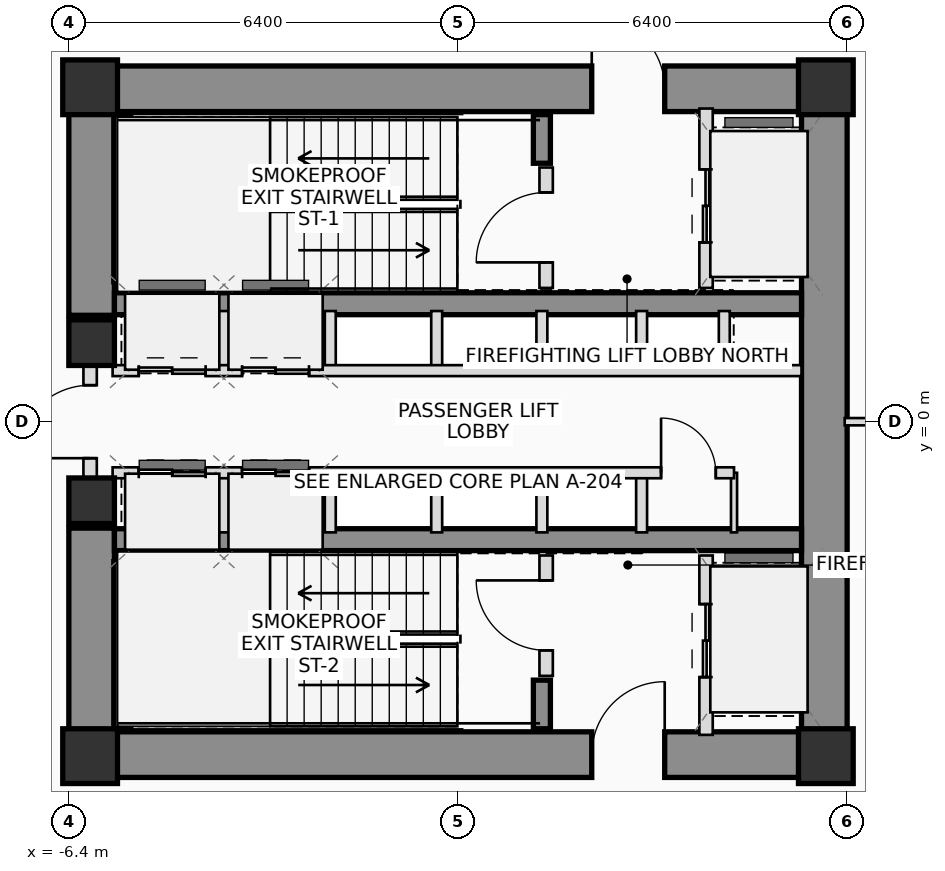
"""IFC4 building model, lengths in metres.
Left out: names, types, materials, properties, quantities, classifications, styles, units other than length and angle.
Written with IfcOpenShell. Run it as: python <this file> out.ifc"""

import sys

from ifc_helpers import new_model, si_unit, direction, frame, frame_2d, origin, origin_2d, place, context, subcontext, project, spatial, rectangle, extrude, source, transform, mapped, element, fill, save


model = new_model("IFC4")
c1 = context("Model", 3, precision=1e-05, world=origin(), true_north=direction((0.0, 1.0)))
c2 = subcontext(c1, "Body", "Model", "MODEL_VIEW")
j1 = project(units=[si_unit("LENGTHUNIT", "METRE"), si_unit("PLANEANGLEUNIT", "RADIAN")], contexts=[c1])
p1 = place(None, origin())
s1 = spatial("IfcSite", under=j1, at=p1, CompositionType="ELEMENT")
p2 = place(p1, origin())
s2 = spatial("IfcBuilding", under=s1, at=p2, CompositionType="ELEMENT")
p3 = place(p2, frame((0.0, 0.0, 23.8)))
s3 = spatial("IfcBuildingStorey", under=s2, at=p3, CompositionType="ELEMENT", Elevation=23.8)
m1 = source(origin(), c2, "Body", "SweptSolid", [
    extrude(rectangle(XDim=0.9, YDim=0.9, at=origin_2d()), origin(), (0.0, 0.0, 1.0), 3.7),
])
for number, where, z_axis, x_axis in (
    (1, (-6.05, -5.5, 0.0), (0.0, 0.0, 1.0), (1.0, 0.0, 0.0)),
    (2, (6.05, -5.5, 0.0), (0.0, 0.0, 1.0), (1.0, 0.0, 0.0)),
    (3, (6.05, 5.5, 0.0), (0.0, 0.0, 1.0), (1.0, 0.0, 0.0)),
    (4, (-6.05, 5.5, 0.0), (0.0, 0.0, 1.0), (1.0, 0.0, 0.0)),
):
    element("IfcColumn", number, at=place(p3, frame(where, z_axis=z_axis, x_axis=x_axis)), inside=s3, PredefinedType="COLUMN", context=c2, shape_type="MappedRepresentation", body=[
        mapped(m1, transform((0.0, 0.0, 0.0), scale=1.0)),
    ])
p4 = place(p3, frame((-6.4, 5.475, 0.0), z_axis=(0.0, 0.0, 1.0), x_axis=(1.0, 0.0, 0.0)))
e5 = element("IfcWall", 5, at=p4, inside=s3, PredefinedType="SHEAR", context=c2, shape_type="SweptSolid", body=[
    extrude(rectangle(XDim=12.8, YDim=0.75, at=frame_2d((6.4, 0.0))), origin(), (0.0, 0.0, 1.0), 3.7),
])
p5 = place(p4, frame((8.6, 0.0, 0.0)))
e6 = element("IfcOpeningElement", 6, at=p5, cuts=e5, PredefinedType="OPENING", context=c2, shape_type="SweptSolid", body=[
    extrude(rectangle(XDim=1.2, YDim=2.2, at=frame_2d((0.6, 1.1))), frame((0.0, 0.385, 0.0), z_axis=(0.0, -1.0, 0.0), x_axis=(1.0, 0.0, 0.0)), (0.0, 0.0, 1.0), 0.77),
])
p6 = place(p3, frame((-6.4, -5.475, 0.0), z_axis=(0.0, 0.0, 1.0), x_axis=(1.0, 0.0, 0.0)))
e7 = element("IfcWall", 7, at=p6, inside=s3, PredefinedType="SHEAR", context=c2, shape_type="SweptSolid", body=[
    extrude(rectangle(XDim=12.8, YDim=0.75, at=frame_2d((6.4, 0.0))), origin(), (0.0, 0.0, 1.0), 3.7),
])
p7 = place(p6, frame((8.6, 0.0, 0.0)))
e8 = element("IfcOpeningElement", 8, at=p7, cuts=e7, PredefinedType="OPENING", context=c2, shape_type="SweptSolid", body=[
    extrude(rectangle(XDim=1.2, YDim=2.2, at=frame_2d((0.6, 1.1))), frame((0.0, 0.385, 0.0), z_axis=(0.0, -1.0, 0.0), x_axis=(1.0, 0.0, 0.0)), (0.0, 0.0, 1.0), 0.77),
])
p8 = place(p3, frame((6.025, -5.1, 0.0), z_axis=(0.0, 0.0, 1.0), x_axis=(0.0, 1.0, 0.0)))
e9 = element("IfcWall", 9, at=p8, inside=s3, PredefinedType="SHEAR", context=c2, shape_type="SweptSolid", body=[
    extrude(rectangle(XDim=10.2, YDim=0.75, at=frame_2d((5.1, 0.0))), origin(), (0.0, 0.0, 1.0), 3.7),
])
for number, where, z_axis, x_axis in (
    (10, (-6.025, -5.1, 0.0), (0.0, 0.0, 1.0), (0.0, 1.0, 0.0)),
    (11, (-6.025, 1.75, 0.0), (0.0, 0.0, 1.0), (0.0, 1.0, 0.0)),
):
    element("IfcWall", number, at=place(p3, frame(where, z_axis=z_axis, x_axis=x_axis)), inside=s3, PredefinedType="SHEAR", context=c2, shape_type="SweptSolid", body=[
        extrude(rectangle(XDim=3.35, YDim=0.75, at=frame_2d((1.675, 0.0))), origin(), (0.0, 0.0, 1.0), 3.7),
    ])
for number, where, z_axis, x_axis in (
    (12, (-5.65, 1.94, 0.0), (0.0, 0.0, 1.0), (1.0, 0.0, 0.0)),
    (13, (-5.65, -1.94, 0.0), (0.0, 0.0, 1.0), (1.0, 0.0, 0.0)),
):
    element("IfcWall", number, at=place(p3, frame(where, z_axis=z_axis, x_axis=x_axis)), inside=s3, PredefinedType="SHEAR", context=c2, shape_type="SweptSolid", body=[
        extrude(rectangle(XDim=11.3, YDim=0.36, at=frame_2d((5.65, 0.0))), origin(), (0.0, 0.0, 1.0), 3.7),
    ])
p9 = place(p3, frame((-5.52, 2.3, 0.0), z_axis=(0.0, 0.0, 1.0), x_axis=(0.0, 1.0, 0.0)))
e14 = element("IfcWall", 14, at=p9, inside=s3, PredefinedType="SHEAR", context=c2, shape_type="SweptSolid", body=[
    extrude(rectangle(XDim=2.75, YDim=0.28, at=frame_2d((1.375, 0.0))), origin(), (0.0, 0.0, 1.0), 3.7),
])
p10 = place(p3, frame((1.38, 4.25, 0.0), z_axis=(0.0, 0.0, 1.0), x_axis=(0.0, 1.0, 0.0)))
e15 = element("IfcWall", 15, at=p10, inside=s3, PredefinedType="SHEAR", context=c2, shape_type="SweptSolid", body=[
    extrude(rectangle(XDim=0.8, YDim=0.28, at=frame_2d((0.4, 0.0))), origin(), (0.0, 0.0, 1.0), 3.7),
])
p11 = place(p3, frame((-5.52, -5.05, 0.0), z_axis=(0.0, 0.0, 1.0), x_axis=(0.0, 1.0, 0.0)))
e16 = element("IfcWall", 16, at=p11, inside=s3, PredefinedType="SHEAR", context=c2, shape_type="SweptSolid", body=[
    extrude(rectangle(XDim=2.75, YDim=0.28, at=frame_2d((1.375, 0.0))), origin(), (0.0, 0.0, 1.0), 3.7),
])
p12 = place(p3, frame((1.38, -5.05, 0.0), z_axis=(0.0, 0.0, 1.0), x_axis=(0.0, 1.0, 0.0)))
e17 = element("IfcWall", 17, at=p12, inside=s3, PredefinedType="SHEAR", context=c2, shape_type="SweptSolid", body=[
    extrude(rectangle(XDim=0.8, YDim=0.28, at=frame_2d((0.4, 0.0))), origin(), (0.0, 0.0, 1.0), 3.7),
])
m2 = source(origin(), c2, "Body", "SweptSolid", [
    extrude(rectangle(XDim=0.75, YDim=0.75, at=origin_2d()), origin(), (0.0, 0.0, 1.0), 3.7),
])
for number, where, z_axis, x_axis in (
    (18, (-6.025, -1.3, 0.0), (0.0, 0.0, 1.0), (1.0, 0.0, 0.0)),
    (19, (-6.025, 1.3, 0.0), (0.0, 0.0, 1.0), (1.0, 0.0, 0.0)),
):
    element("IfcColumn", number, at=place(p3, frame(where, z_axis=z_axis, x_axis=x_axis)), inside=s3, PredefinedType="COLUMN", context=c2, shape_type="MappedRepresentation", body=[
        mapped(m2, transform((0.0, 0.0, 0.0), scale=1.0)),
    ])
p13 = place(p3, frame((-6.05, -0.95, 0.0), z_axis=(0.0, 0.0, 1.0), x_axis=(0.0, 1.0, 0.0)))
e20 = element("IfcWall", 20, at=p13, inside=s3, PredefinedType="PLUMBINGWALL", context=c2, shape_type="SweptSolid", body=[
    extrude(rectangle(XDim=1.9, YDim=0.22, at=frame_2d((0.95, 0.0))), origin(), (0.0, 0.0, 1.0), 2.475),
])
p14 = place(p13, frame((0.35, 0.0, 0.0)))
e21 = element("IfcOpeningElement", 21, at=p14, cuts=e20, PredefinedType="OPENING", context=c2, shape_type="SweptSolid", body=[
    extrude(rectangle(XDim=1.2, YDim=2.2, at=frame_2d((0.6, 1.1))), frame((0.0, 0.12, 0.0), z_axis=(0.0, -1.0, 0.0), x_axis=(1.0, 0.0, 0.0)), (0.0, 0.0, 1.0), 0.24),
])
p15 = place(p3, frame((1.45, 2.2, 0.0), z_axis=(0.0, 0.0, 1.0), x_axis=(0.0, 1.0, 0.0)))
e22 = element("IfcWall", 22, at=p15, inside=s3, PredefinedType="PLUMBINGWALL", context=c2, shape_type="SweptSolid", body=[
    extrude(rectangle(XDim=1.98, YDim=0.22, at=frame_2d((0.99, 0.0))), origin(), (0.0, 0.0, 1.0), 3.495),
])
p16 = place(p15, frame((0.42, 0.0, 0.0)))
e23 = element("IfcOpeningElement", 23, at=p16, cuts=e22, PredefinedType="OPENING", context=c2, shape_type="SweptSolid", body=[
    extrude(rectangle(XDim=1.15, YDim=2.15, at=frame_2d((0.575, 1.075))), frame((0.0, 0.12, 0.0), z_axis=(0.0, -1.0, 0.0), x_axis=(1.0, 0.0, 0.0)), (0.0, 0.0, 1.0), 0.24),
])
p17 = place(p3, frame((4.08, 2.2, 0.0), z_axis=(0.0, 0.0, 1.0), x_axis=(0.0, 1.0, 0.0)))
e24 = element("IfcWall", 24, at=p17, inside=s3, PredefinedType="PLUMBINGWALL", context=c2, shape_type="SweptSolid", body=[
    extrude(rectangle(XDim=2.95, YDim=0.22, at=frame_2d((1.475, 0.0))), origin(), (0.0, 0.0, 1.0), 3.495),
])
p18 = place(p17, frame((0.75, 0.0, 0.0)))
e25 = element("IfcOpeningElement", 25, at=p18, cuts=e24, PredefinedType="OPENING", context=c2, shape_type="SweptSolid", body=[
    extrude(rectangle(XDim=1.2, YDim=2.25, at=frame_2d((0.6, 1.125))), frame((0.0, 0.12, 0.0), z_axis=(0.0, -1.0, 0.0), x_axis=(1.0, 0.0, 0.0)), (0.0, 0.0, 1.0), 0.24),
])
p19 = place(p3, frame((1.45, -4.18, 0.0), z_axis=(0.0, 0.0, 1.0), x_axis=(0.0, 1.0, 0.0)))
e26 = element("IfcWall", 26, at=p19, inside=s3, PredefinedType="PLUMBINGWALL", context=c2, shape_type="SweptSolid", body=[
    extrude(rectangle(XDim=1.98, YDim=0.22, at=frame_2d((0.99, 0.0))), origin(), (0.0, 0.0, 1.0), 3.495),
])
p20 = place(p19, frame((0.42, 0.0, 0.0)))
e27 = element("IfcOpeningElement", 27, at=p20, cuts=e26, PredefinedType="OPENING", context=c2, shape_type="SweptSolid", body=[
    extrude(rectangle(XDim=1.15, YDim=2.15, at=frame_2d((0.575, 1.075))), frame((0.0, 0.12, 0.0), z_axis=(0.0, -1.0, 0.0), x_axis=(1.0, 0.0, 0.0)), (0.0, 0.0, 1.0), 0.24),
])
p21 = place(p3, frame((4.08, -5.15, 0.0), z_axis=(0.0, 0.0, 1.0), x_axis=(0.0, 1.0, 0.0)))
e28 = element("IfcWall", 28, at=p21, inside=s3, PredefinedType="PLUMBINGWALL", context=c2, shape_type="SweptSolid", body=[
    extrude(rectangle(XDim=2.95, YDim=0.22, at=frame_2d((1.475, 0.0))), origin(), (0.0, 0.0, 1.0), 3.495),
])
p22 = place(p21, frame((0.95, 0.0, 0.0)))
e29 = element("IfcOpeningElement", 29, at=p22, cuts=e28, PredefinedType="OPENING", context=c2, shape_type="SweptSolid", body=[
    extrude(rectangle(XDim=1.2, YDim=2.25, at=frame_2d((0.6, 1.125))), frame((0.0, 0.12, 0.0), z_axis=(0.0, -1.0, 0.0), x_axis=(1.0, 0.0, 0.0)), (0.0, 0.0, 1.0), 0.24),
])
for number, where, z_axis, x_axis in (
    (30, (-3.85, 0.84, 0.0), (0.0, 0.0, 1.0), (0.0, 1.0, 0.0)),
    (31, (-3.85, -1.82, 0.0), (0.0, 0.0, 1.0), (0.0, 1.0, 0.0)),
    (32, (-2.1, 0.84, 0.0), (0.0, 0.0, 1.0), (0.0, 1.0, 0.0)),
    (33, (-2.1, -1.82, 0.0), (0.0, 0.0, 1.0), (0.0, 1.0, 0.0)),
    (34, (-0.35, 0.84, 0.0), (0.0, 0.0, 1.0), (0.0, 1.0, 0.0)),
    (35, (-0.35, -1.82, 0.0), (0.0, 0.0, 1.0), (0.0, 1.0, 0.0)),
    (36, (1.38, 0.84, 0.0), (0.0, 0.0, 1.0), (0.0, 1.0, 0.0)),
    (37, (1.38, -1.82, 0.0), (0.0, 0.0, 1.0), (0.0, 1.0, 0.0)),
    (38, (3.02, 0.84, 0.0), (0.0, 0.0, 1.0), (0.0, 1.0, 0.0)),
    (39, (4.38, 0.84, 0.0), (0.0, 0.0, 1.0), (0.0, 1.0, 0.0)),
    (40, (3.02, -1.82, 0.0), (0.0, 0.0, 1.0), (0.0, 1.0, 0.0)),
):
    element("IfcWall", number, at=place(p3, frame(where, z_axis=z_axis, x_axis=x_axis)), inside=s3, PredefinedType="PLUMBINGWALL", context=c2, shape_type="SweptSolid", body=[
        extrude(rectangle(XDim=0.98, YDim=0.18, at=frame_2d((0.49, 0.0))), origin(), (0.0, 0.0, 1.0), 3.495),
    ])
p23 = place(p3, frame((4.54, -1.82, 0.0), z_axis=(0.0, 0.0, 1.0), x_axis=(0.0, 1.0, 0.0)))
e41 = element("IfcWall", 41, at=p23, inside=s3, PredefinedType="PARTITIONING", context=c2, shape_type="SweptSolid", body=[
    extrude(rectangle(XDim=0.98, YDim=0.1, at=frame_2d((0.49, 0.0))), origin(), (0.0, 0.0, 1.0), 3.495),
])
p24 = place(p3, frame((-5.68, 0.84, 0.0), z_axis=(0.0, 0.0, 1.0), x_axis=(1.0, 0.0, 0.0)))
e42 = element("IfcWall", 42, at=p24, inside=s3, PredefinedType="PLUMBINGWALL", context=c2, shape_type="SweptSolid", body=[
    extrude(rectangle(XDim=11.33, YDim=0.18, at=frame_2d((5.665, 0.0))), origin(), (0.0, 0.0, 1.0), 3.495),
])
p25 = place(p24, frame((0.43, 0.0, 0.0)))
e43 = element("IfcOpeningElement", 43, at=p25, cuts=e42, PredefinedType="OPENING", context=c2, shape_type="SweptSolid", body=[
    extrude(rectangle(XDim=1.1, YDim=2.2, at=frame_2d((0.55, 1.1))), frame((0.0, 0.1, 0.0), z_axis=(0.0, -1.0, 0.0), x_axis=(1.0, 0.0, 0.0)), (0.0, 0.0, 1.0), 0.2),
])
p26 = place(p24, frame((2.13, 0.0, 0.0)))
e44 = element("IfcOpeningElement", 44, at=p26, cuts=e42, PredefinedType="OPENING", context=c2, shape_type="SweptSolid", body=[
    extrude(rectangle(XDim=1.1, YDim=2.2, at=frame_2d((0.55, 1.1))), frame((0.0, 0.1, 0.0), z_axis=(0.0, -1.0, 0.0), x_axis=(1.0, 0.0, 0.0)), (0.0, 0.0, 1.0), 0.2),
])
p27 = place(p3, frame((-5.68, -0.84, 0.0), z_axis=(0.0, 0.0, 1.0), x_axis=(1.0, 0.0, 0.0)))
e45 = element("IfcWall", 45, at=p27, inside=s3, PredefinedType="PLUMBINGWALL", context=c2, shape_type="SweptSolid", body=[
    extrude(rectangle(XDim=10.22, YDim=0.18, at=frame_2d((5.11, 0.0))), origin(), (0.0, 0.0, 1.0), 3.495),
])
p28 = place(p27, frame((0.43, 0.0, 0.0)))
e46 = element("IfcOpeningElement", 46, at=p28, cuts=e45, PredefinedType="OPENING", context=c2, shape_type="SweptSolid", body=[
    extrude(rectangle(XDim=1.1, YDim=2.2, at=frame_2d((0.55, 1.1))), frame((0.0, 0.1, 0.0), z_axis=(0.0, -1.0, 0.0), x_axis=(1.0, 0.0, 0.0)), (0.0, 0.0, 1.0), 0.2),
])
p29 = place(p27, frame((2.13, 0.0, 0.0)))
e47 = element("IfcOpeningElement", 47, at=p29, cuts=e45, PredefinedType="OPENING", context=c2, shape_type="SweptSolid", body=[
    extrude(rectangle(XDim=1.1, YDim=2.2, at=frame_2d((0.55, 1.1))), frame((0.0, 0.1, 0.0), z_axis=(0.0, -1.0, 0.0), x_axis=(1.0, 0.0, 0.0)), (0.0, 0.0, 1.0), 0.2),
])
p30 = place(p27, frame((9.02, 0.0, 0.0)))
e48 = element("IfcOpeningElement", 48, at=p30, cuts=e45, PredefinedType="OPENING", context=c2, shape_type="SweptSolid", body=[
    extrude(rectangle(XDim=0.9, YDim=2.05, at=frame_2d((0.45, 1.025))), frame((0.0, 0.1, 0.0), z_axis=(0.0, -1.0, 0.0), x_axis=(1.0, 0.0, 0.0)), (0.0, 0.0, 1.0), 0.2),
])
p31 = place(p3, frame((6.36, 0.0, 0.0), z_axis=(0.0, 0.0, 1.0), x_axis=(1.0, 0.0, 0.0)))
e49 = element("IfcWall", 49, at=p31, inside=s3, PredefinedType="PARTITIONING", context=c2, shape_type="SweptSolid", body=[
    extrude(rectangle(XDim=19.191, YDim=0.12, at=frame_2d((9.595, 0.0))), origin(), (0.0, 0.0, 1.0), 2.96),
])
p32 = place(p5, origin())
e50 = element("IfcDoor", 50, at=p32, inside=s3, OperationType="SINGLE_SWING_LEFT", PredefinedType="DOOR", context=c2, shape_type="SweptSolid", body=[
    extrude(rectangle(XDim=1.2, YDim=2.2, at=frame_2d((0.6, 1.1))), frame((0.0, 0.025, 0.0), z_axis=(0.0, -1.0, 0.0), x_axis=(1.0, 0.0, 0.0)), (0.0, 0.0, 1.0), 0.05),
])
fill(e6, e50)
p33 = place(p7, origin())
e51 = element("IfcDoor", 51, at=p33, inside=s3, OperationType="SINGLE_SWING_RIGHT", PredefinedType="DOOR", context=c2, shape_type="SweptSolid", body=[
    extrude(rectangle(XDim=1.2, YDim=2.2, at=frame_2d((0.6, 1.1))), frame((0.0, 0.025, 0.0), z_axis=(0.0, -1.0, 0.0), x_axis=(1.0, 0.0, 0.0)), (0.0, 0.0, 1.0), 0.05),
])
fill(e8, e51)
p34 = place(p14, origin())
e52 = element("IfcDoor", 52, at=p34, inside=s3, OperationType="SINGLE_SWING_LEFT", PredefinedType="DOOR", context=c2, shape_type="SweptSolid", body=[
    extrude(rectangle(XDim=1.2, YDim=2.2, at=frame_2d((0.6, 1.1))), frame((0.0, 0.025, 0.0), z_axis=(0.0, -1.0, 0.0), x_axis=(1.0, 0.0, 0.0)), (0.0, 0.0, 1.0), 0.05),
])
fill(e21, e52)
p35 = place(p16, origin())
e53 = element("IfcDoor", 53, at=p35, inside=s3, OperationType="SINGLE_SWING_LEFT", PredefinedType="DOOR", context=c2, shape_type="SweptSolid", body=[
    extrude(rectangle(XDim=1.15, YDim=2.15, at=frame_2d((0.575, 1.075))), frame((0.0, 0.025, 0.0), z_axis=(0.0, -1.0, 0.0), x_axis=(1.0, 0.0, 0.0)), (0.0, 0.0, 1.0), 0.05),
])
fill(e23, e53)
p36 = place(p18, origin())
e54 = element("IfcDoor", 54, at=p36, inside=s3, OperationType="DOUBLE_DOOR_SLIDING", PredefinedType="DOOR", context=c2, shape_type="SweptSolid", body=[
    extrude(rectangle(XDim=1.2, YDim=2.25, at=frame_2d((0.6, 1.125))), frame((0.0, 0.025, 0.0), z_axis=(0.0, -1.0, 0.0), x_axis=(1.0, 0.0, 0.0)), (0.0, 0.0, 1.0), 0.05),
])
fill(e25, e54)
p37 = place(p20, origin())
e55 = element("IfcDoor", 55, at=p37, inside=s3, OperationType="SINGLE_SWING_RIGHT", PredefinedType="DOOR", context=c2, shape_type="SweptSolid", body=[
    extrude(rectangle(XDim=1.15, YDim=2.15, at=frame_2d((0.575, 1.075))), frame((0.0, 0.025, 0.0), z_axis=(0.0, -1.0, 0.0), x_axis=(1.0, 0.0, 0.0)), (0.0, 0.0, 1.0), 0.05),
])
fill(e27, e55)
p38 = place(p22, origin())
e56 = element("IfcDoor", 56, at=p38, inside=s3, OperationType="DOUBLE_DOOR_SLIDING", PredefinedType="DOOR", context=c2, shape_type="SweptSolid", body=[
    extrude(rectangle(XDim=1.2, YDim=2.25, at=frame_2d((0.6, 1.125))), frame((0.0, 0.025, 0.0), z_axis=(0.0, -1.0, 0.0), x_axis=(1.0, 0.0, 0.0)), (0.0, 0.0, 1.0), 0.05),
])
fill(e29, e56)
p39 = place(p25, origin())
e57 = element("IfcDoor", 57, at=p39, inside=s3, OperationType="DOUBLE_DOOR_SLIDING", PredefinedType="DOOR", context=c2, shape_type="SweptSolid", body=[
    extrude(rectangle(XDim=1.1, YDim=2.2, at=frame_2d((0.55, 1.1))), frame((0.0, 0.025, 0.0), z_axis=(0.0, -1.0, 0.0), x_axis=(1.0, 0.0, 0.0)), (0.0, 0.0, 1.0), 0.05),
])
fill(e43, e57)
p40 = place(p26, origin())
e58 = element("IfcDoor", 58, at=p40, inside=s3, OperationType="DOUBLE_DOOR_SLIDING", PredefinedType="DOOR", context=c2, shape_type="SweptSolid", body=[
    extrude(rectangle(XDim=1.1, YDim=2.2, at=frame_2d((0.55, 1.1))), frame((0.0, 0.025, 0.0), z_axis=(0.0, -1.0, 0.0), x_axis=(1.0, 0.0, 0.0)), (0.0, 0.0, 1.0), 0.05),
])
fill(e44, e58)
p41 = place(p28, origin())
e59 = element("IfcDoor", 59, at=p41, inside=s3, OperationType="DOUBLE_DOOR_SLIDING", PredefinedType="DOOR", context=c2, shape_type="SweptSolid", body=[
    extrude(rectangle(XDim=1.1, YDim=2.2, at=frame_2d((0.55, 1.1))), frame((0.0, 0.025, 0.0), z_axis=(0.0, -1.0, 0.0), x_axis=(1.0, 0.0, 0.0)), (0.0, 0.0, 1.0), 0.05),
])
fill(e46, e59)
p42 = place(p29, origin())
e60 = element("IfcDoor", 60, at=p42, inside=s3, OperationType="DOUBLE_DOOR_SLIDING", PredefinedType="DOOR", context=c2, shape_type="SweptSolid", body=[
    extrude(rectangle(XDim=1.1, YDim=2.2, at=frame_2d((0.55, 1.1))), frame((0.0, 0.025, 0.0), z_axis=(0.0, -1.0, 0.0), x_axis=(1.0, 0.0, 0.0)), (0.0, 0.0, 1.0), 0.05),
])
fill(e47, e60)
p43 = place(p30, origin())
e61 = element("IfcDoor", 61, at=p43, inside=s3, OperationType="SINGLE_SWING_LEFT", PredefinedType="DOOR", context=c2, shape_type="SweptSolid", body=[
    extrude(rectangle(XDim=0.9, YDim=2.05, at=frame_2d((0.45, 1.025))), frame((0.0, 0.025, 0.0), z_axis=(0.0, -1.0, 0.0), x_axis=(1.0, 0.0, 0.0)), (0.0, 0.0, 1.0), 0.05),
])
fill(e48, e61)
save(model, sys.argv[1])
